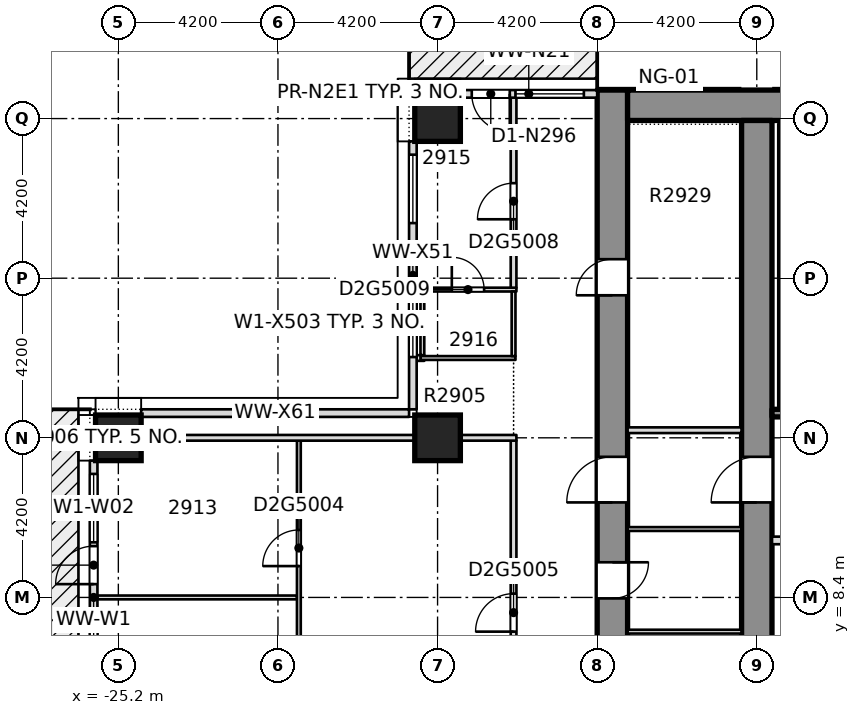
"""IFC4 building model, lengths in metres.
Left out: names, types, materials, properties, quantities, classifications, styles, units other than length and angle.
Written with IfcOpenShell. Run it as: python <this file> out.ifc"""

import sys

from ifc_helpers import new_model, si_unit, direction, frame, frame_2d, origin, origin_2d, place, context, subcontext, project, spatial, rectangle, extrude, element, fill, save


model = new_model("IFC4")
c1 = context("Model", 3, precision=1e-05, world=origin(), true_north=direction((0.0, 1.0)))
c2 = subcontext(c1, "Body", "Model", "MODEL_VIEW")
j1 = project(units=[si_unit("LENGTHUNIT", "METRE"), si_unit("PLANEANGLEUNIT", "RADIAN")], contexts=[c1])
p1 = place(None, origin())
s1 = spatial("IfcSite", under=j1, at=p1, CompositionType="ELEMENT")
p2 = place(p1, origin())
s2 = spatial("IfcBuilding", under=s1, at=p2, CompositionType="ELEMENT")
p3 = place(p2, frame((0.0, 0.0, 114.9)))
s3 = spatial("IfcBuildingStorey", under=s2, at=p3, CompositionType="ELEMENT", Elevation=114.9)
p4 = place(p3, frame((-12.2, -8.4, -0.32), z_axis=(0.0, 0.0, 1.0), x_axis=(0.0, 1.0, 0.0)))
e1 = element("IfcWall", 1, at=p4, inside=s3, PredefinedType="SHEAR", context=c2, shape_type="SweptSolid", body=[
    extrude(rectangle(XDim=30.15, YDim=0.8, at=frame_2d((15.075, 0.0))), origin(), (0.0, 0.0, 1.0), 3.45),
])
p5 = place(p4, frame((2.875, 0.0, 0.32)))
e2 = element("IfcOpeningElement", 2, at=p5, cuts=e1, PredefinedType="OPENING", context=c2, shape_type="SweptSolid", body=[
    extrude(rectangle(XDim=0.95, YDim=2.1, at=frame_2d((0.475, 1.05))), frame((0.0, 0.41, 0.0), z_axis=(0.0, -1.0, 0.0), x_axis=(1.0, 0.0, 0.0)), (0.0, 0.0, 1.0), 0.82),
])
p6 = place(p4, frame((6.575, 0.0, 0.32)))
e3 = element("IfcOpeningElement", 3, at=p6, cuts=e1, PredefinedType="OPENING", context=c2, shape_type="SweptSolid", body=[
    extrude(rectangle(XDim=0.95, YDim=2.1, at=frame_2d((0.475, 1.05))), frame((0.0, 0.41, 0.0), z_axis=(0.0, -1.0, 0.0), x_axis=(1.0, 0.0, 0.0)), (0.0, 0.0, 1.0), 0.82),
])
p7 = place(p4, frame((9.425, 0.0, 0.32)))
e4 = element("IfcOpeningElement", 4, at=p7, cuts=e1, PredefinedType="OPENING", context=c2, shape_type="SweptSolid", body=[
    extrude(rectangle(XDim=0.95, YDim=2.1, at=frame_2d((0.475, 1.05))), frame((0.0, 0.41, 0.0), z_axis=(0.0, -1.0, 0.0), x_axis=(1.0, 0.0, 0.0)), (0.0, 0.0, 1.0), 0.82),
])
p8 = place(p4, frame((13.225, 0.0, 0.32)))
e5 = element("IfcOpeningElement", 5, at=p8, cuts=e1, PredefinedType="OPENING", context=c2, shape_type="SweptSolid", body=[
    extrude(rectangle(XDim=0.95, YDim=2.1, at=frame_2d((0.475, 1.05))), frame((0.0, 0.41, 0.0), z_axis=(0.0, -1.0, 0.0), x_axis=(1.0, 0.0, 0.0)), (0.0, 0.0, 1.0), 0.82),
])
p9 = place(p4, frame((16.775, 0.0, 0.32)))
e6 = element("IfcOpeningElement", 6, at=p9, cuts=e1, PredefinedType="OPENING", context=c2, shape_type="SweptSolid", body=[
    extrude(rectangle(XDim=0.95, YDim=2.1, at=frame_2d((0.475, 1.05))), frame((0.0, 0.41, 0.0), z_axis=(0.0, -1.0, 0.0), x_axis=(1.0, 0.0, 0.0)), (0.0, 0.0, 1.0), 0.82),
])
p10 = place(p4, frame((24.75, 0.0, 0.32)))
e7 = element("IfcOpeningElement", 7, at=p10, cuts=e1, PredefinedType="OPENING", context=c2, shape_type="SweptSolid", body=[
    extrude(rectangle(XDim=0.95, YDim=2.1, at=frame_2d((0.475, 1.05))), frame((0.0, 0.41, 0.0), z_axis=(0.0, -1.0, 0.0), x_axis=(1.0, 0.0, 0.0)), (0.0, 0.0, 1.0), 0.82),
])
p11 = place(p4, frame((19.3, 0.0, 0.32)))
e8 = element("IfcOpeningElement", 8, at=p11, cuts=e1, PredefinedType="OPENING", context=c2, shape_type="SweptSolid", body=[
    extrude(rectangle(XDim=1.2, YDim=2.1, at=frame_2d((0.6, 1.05))), frame((0.0, 0.41, 0.0), z_axis=(0.0, -1.0, 0.0), x_axis=(1.0, 0.0, 0.0)), (0.0, 0.0, 1.0), 0.82),
])
p12 = place(p3, frame((-11.8, 21.35, -0.32), z_axis=(0.0, 0.0, 1.0), x_axis=(1.0, 0.0, 0.0)))
e9 = element("IfcWall", 9, at=p12, inside=s3, PredefinedType="SHEAR", context=c2, shape_type="SweptSolid", body=[
    extrude(rectangle(XDim=23.6, YDim=0.8, at=frame_2d((11.8, 0.0))), origin(), (0.0, 0.0, 1.0), 3.45),
])
p13 = place(p3, frame((-8.4, -7.6, -0.32), z_axis=(0.0, 0.0, 1.0), x_axis=(0.0, 1.0, 0.0)))
e10 = element("IfcWall", 10, at=p13, inside=s3, PredefinedType="SHEAR", context=c2, shape_type="SweptSolid", body=[
    extrude(rectangle(XDim=28.55, YDim=0.8, at=frame_2d((14.275, 0.0))), origin(), (0.0, 0.0, 1.0), 3.45),
])
p14 = place(p13, frame((18.5, 0.0, 0.32)))
e11 = element("IfcOpeningElement", 11, at=p14, cuts=e10, PredefinedType="OPENING", context=c2, shape_type="SweptSolid", body=[
    extrude(rectangle(XDim=1.2, YDim=2.1, at=frame_2d((0.6, 1.05))), frame((0.0, 0.41, 0.0), z_axis=(0.0, -1.0, 0.0), x_axis=(1.0, 0.0, 0.0)), (0.0, 0.0, 1.0), 0.82),
])
for number, where, z_axis, x_axis in (
    (12, (-25.2, 12.6, -0.32), (0.0, 0.0, 1.0), (1.0, 0.0, 0.0)),
    (13, (-16.8, 12.6, -0.32), (0.0, 0.0, 1.0), (1.0, 0.0, 0.0)),
    (14, (-16.8, 21.0, -0.32), (0.0, 0.0, 1.0), (1.0, 0.0, 0.0)),
):
    element("IfcColumn", number, at=place(p3, frame(where, z_axis=z_axis, x_axis=x_axis)), inside=s3, PredefinedType="COLUMN", context=c2, shape_type="SweptSolid", body=[
        extrude(rectangle(XDim=1.2, YDim=1.2, at=origin_2d()), origin(), (0.0, 0.0, 1.0), 3.45),
    ])
p15 = place(p3, frame((-25.75, 8.4, 0.0), z_axis=(0.0, 0.0, 1.0), x_axis=(1.0, 0.0, 0.0)))
e15 = element("IfcWall", 15, at=p15, inside=s3, PredefinedType="PARTITIONING", context=c2, shape_type="SweptSolid", body=[
    extrude(rectangle(XDim=5.25, YDim=0.1, at=frame_2d((2.625, 0.0))), origin(), (0.0, 0.0, 1.0), 3.13),
])
p16 = place(p3, frame((-25.75, 12.6, 0.0), z_axis=(0.0, 0.0, 1.0), x_axis=(1.0, 0.0, 0.0)))
e16 = element("IfcWall", 16, at=p16, inside=s3, PredefinedType="PARTITIONING", context=c2, shape_type="SweptSolid", body=[
    extrude(rectangle(XDim=1.15, YDim=0.15, at=frame_2d((0.575, 0.0))), origin(), (0.0, 0.0, 1.0), 3.13),
])
p17 = place(p3, frame((-17.35, 14.7, 0.0), z_axis=(0.0, 0.0, 1.0), x_axis=(1.0, 0.0, 0.0)))
e17 = element("IfcWall", 17, at=p17, inside=s3, PredefinedType="PARTITIONING", context=c2, shape_type="SweptSolid", body=[
    extrude(rectangle(XDim=0.2, YDim=0.15, at=frame_2d((0.1, 0.0))), origin(), (0.0, 0.0, 1.0), 3.13),
])
p18 = place(p3, frame((-17.25, 14.7, 0.0), z_axis=(0.0, 0.0, 1.0), x_axis=(1.0, 0.0, 0.0)))
e18 = element("IfcWall", 18, at=p18, inside=s3, PredefinedType="PARTITIONING", context=c2, shape_type="SweptSolid", body=[
    extrude(rectangle(XDim=2.5, YDim=0.1, at=frame_2d((1.25, 0.0))), origin(), (0.0, 0.0, 1.0), 3.13),
])
p19 = place(p3, frame((-17.25, 16.5, 0.0), z_axis=(0.0, 0.0, 1.0), x_axis=(1.0, 0.0, 0.0)))
e19 = element("IfcWall", 19, at=p19, inside=s3, PredefinedType="PARTITIONING", context=c2, shape_type="SweptSolid", body=[
    extrude(rectangle(XDim=2.525, YDim=0.1, at=frame_2d((1.262, 0.0))), origin(), (0.0, 0.0, 1.0), 3.13),
])
p20 = place(p19, frame((0.825, 0.0, 0.0)))
e20 = element("IfcOpeningElement", 20, at=p20, cuts=e19, PredefinedType="OPENING", context=c2, shape_type="SweptSolid", body=[
    extrude(rectangle(XDim=0.85, YDim=2.1, at=frame_2d((0.425, 1.05))), frame((0.0, 0.06, 0.0), z_axis=(0.0, -1.0, 0.0), x_axis=(1.0, 0.0, 0.0)), (0.0, 0.0, 1.0), 0.12),
])
p21 = place(p3, frame((-20.45, 5.05, 0.0), z_axis=(0.0, 0.0, 1.0), x_axis=(0.0, 1.0, 0.0)))
e21 = element("IfcWall", 21, at=p21, inside=s3, PredefinedType="PARTITIONING", context=c2, shape_type="SweptSolid", body=[
    extrude(rectangle(XDim=7.475, YDim=0.1, at=frame_2d((3.737, 0.0))), origin(), (0.0, 0.0, 1.0), 3.13),
])
p22 = place(p21, frame((4.175, 0.0, 0.0)))
e22 = element("IfcOpeningElement", 22, at=p22, cuts=e21, PredefinedType="OPENING", context=c2, shape_type="SweptSolid", body=[
    extrude(rectangle(XDim=0.95, YDim=2.1, at=frame_2d((0.475, 1.05))), frame((0.0, 0.06, 0.0), z_axis=(0.0, -1.0, 0.0), x_axis=(1.0, 0.0, 0.0)), (0.0, 0.0, 1.0), 0.12),
])
p23 = place(p3, frame((-17.2, 14.775, 0.0), z_axis=(0.0, 0.0, 1.0), x_axis=(0.0, 1.0, 0.0)))
e23 = element("IfcWall", 23, at=p23, inside=s3, PredefinedType="PARTITIONING", context=c2, shape_type="SweptSolid", body=[
    extrude(rectangle(XDim=1.675, YDim=0.1, at=frame_2d((0.837, 0.0))), origin(), (0.0, 0.0, 1.0), 3.13),
])
p24 = place(p3, frame((-14.8, -6.225, 0.0), z_axis=(0.0, 0.0, 1.0), x_axis=(0.0, 1.0, 0.0)))
e24 = element("IfcWall", 24, at=p24, inside=s3, PredefinedType="PARTITIONING", context=c2, shape_type="SweptSolid", body=[
    extrude(rectangle(XDim=18.75, YDim=0.15, at=frame_2d((9.375, 0.0))), origin(), (0.0, 0.0, 1.0), 3.13),
])
p25 = place(p24, frame((13.725, 0.0, 0.0)))
e25 = element("IfcOpeningElement", 25, at=p25, cuts=e24, PredefinedType="OPENING", context=c2, shape_type="SweptSolid", body=[
    extrude(rectangle(XDim=1.0, YDim=2.1, at=frame_2d((0.5, 1.05))), frame((0.0, 0.085, 0.0), z_axis=(0.0, -1.0, 0.0), x_axis=(1.0, 0.0, 0.0)), (0.0, 0.0, 1.0), 0.17),
])
p26 = place(p24, frame((5.675, 0.0, 0.0)))
e26 = element("IfcOpeningElement", 26, at=p26, cuts=e24, PredefinedType="OPENING", context=c2, shape_type="SweptSolid", body=[
    extrude(rectangle(XDim=1.1, YDim=2.1, at=frame_2d((0.55, 1.05))), frame((0.0, 0.085, 0.0), z_axis=(0.0, -1.0, 0.0), x_axis=(1.0, 0.0, 0.0)), (0.0, 0.0, 1.0), 0.17),
])
p27 = place(p3, frame((-14.8, 14.75, 0.0), z_axis=(0.0, 0.0, 1.0), x_axis=(0.0, 1.0, 0.0)))
e27 = element("IfcWall", 27, at=p27, inside=s3, PredefinedType="PARTITIONING", context=c2, shape_type="SweptSolid", body=[
    extrude(rectangle(XDim=1.7, YDim=0.1, at=frame_2d((0.85, 0.0))), origin(), (0.0, 0.0, 1.0), 3.13),
])
p28 = place(p3, frame((-14.8, 16.55, 0.0), z_axis=(0.0, 0.0, 1.0), x_axis=(0.0, 1.0, 0.0)))
e28 = element("IfcWall", 28, at=p28, inside=s3, PredefinedType="PARTITIONING", context=c2, shape_type="SweptSolid", body=[
    extrude(rectangle(XDim=5.0, YDim=0.15, at=frame_2d((2.5, 0.0))), origin(), (0.0, 0.0, 1.0), 3.13),
])
p29 = place(p28, frame((1.8, 0.0, 0.0)))
e29 = element("IfcOpeningElement", 29, at=p29, cuts=e28, PredefinedType="OPENING", context=c2, shape_type="SweptSolid", body=[
    extrude(rectangle(XDim=0.95, YDim=2.1, at=frame_2d((0.475, 1.05))), frame((0.0, 0.085, 0.0), z_axis=(0.0, -1.0, 0.0), x_axis=(1.0, 0.0, 0.0)), (0.0, 0.0, 1.0), 0.17),
])
p30 = place(p3, frame((-12.6, 21.65, 0.0), z_axis=(0.0, 0.0, 1.0), x_axis=(-1.0, 0.0, 0.0)))
e30 = element("IfcWall", 30, at=p30, inside=s3, PredefinedType="STANDARD", context=c2, shape_type="SweptSolid", body=[
    extrude(rectangle(XDim=3.6, YDim=0.2, at=frame_2d((1.8, 0.0))), origin(), (0.0, 0.0, 1.0), 3.13),
])
p31 = place(p30, frame((0.35, 0.0, 0.2)))
e31 = element("IfcOpeningElement", 31, at=p31, cuts=e30, PredefinedType="OPENING", context=c2, shape_type="SweptSolid", body=[
    extrude(rectangle(XDim=1.8, YDim=2.65, at=frame_2d((0.9, 1.325))), frame((0.0, 0.11, 0.0), z_axis=(0.0, -1.0, 0.0), x_axis=(1.0, 0.0, 0.0)), (0.0, 0.0, 1.0), 0.22),
])
p32 = place(p30, frame((2.3, 0.0, 0.0)))
e32 = element("IfcOpeningElement", 32, at=p32, cuts=e30, PredefinedType="OPENING", context=c2, shape_type="SweptSolid", body=[
    extrude(rectangle(XDim=1.0, YDim=2.4, at=frame_2d((0.5, 1.2))), frame((0.0, 0.11, 0.0), z_axis=(0.0, -1.0, 0.0), x_axis=(1.0, 0.0, 0.0)), (0.0, 0.0, 1.0), 0.22),
])
p33 = place(p3, frame((-17.45, 20.4, 0.0), z_axis=(0.0, 0.0, 1.0), x_axis=(0.0, -1.0, 0.0)))
e33 = element("IfcWall", 33, at=p33, inside=s3, PredefinedType="STANDARD", context=c2, shape_type="SweptSolid", body=[
    extrude(rectangle(XDim=7.05, YDim=0.2, at=frame_2d((3.525, 0.0))), origin(), (0.0, 0.0, 1.0), 3.13),
])
p34 = place(p33, frame((3.875, 0.0, 0.2)))
e34 = element("IfcOpeningElement", 34, at=p34, cuts=e33, PredefinedType="OPENING", context=c2, shape_type="SweptSolid", body=[
    extrude(rectangle(XDim=1.8, YDim=2.65, at=frame_2d((0.9, 1.325))), frame((0.0, 0.11, 0.0), z_axis=(0.0, -1.0, 0.0), x_axis=(1.0, 0.0, 0.0)), (0.0, 0.0, 1.0), 0.22),
])
p35 = place(p33, frame((0.35, 0.0, 0.2)))
e35 = element("IfcOpeningElement", 35, at=p35, cuts=e33, PredefinedType="OPENING", context=c2, shape_type="SweptSolid", body=[
    extrude(rectangle(XDim=1.8, YDim=2.65, at=frame_2d((0.9, 1.325))), frame((0.0, 0.11, 0.0), z_axis=(0.0, -1.0, 0.0), x_axis=(1.0, 0.0, 0.0)), (0.0, 0.0, 1.0), 0.22),
])
p36 = place(p3, frame((-17.55, 13.25, 0.0), z_axis=(0.0, 0.0, 1.0), x_axis=(-1.0, 0.0, 0.0)))
e36 = element("IfcWall", 36, at=p36, inside=s3, PredefinedType="STANDARD", context=c2, shape_type="SweptSolid", body=[
    extrude(rectangle(XDim=7.05, YDim=0.2, at=frame_2d((3.525, 0.0))), origin(), (0.0, 0.0, 1.0), 3.13),
])
p37 = place(p3, frame((-25.85, 12.0, 0.0), z_axis=(0.0, 0.0, 1.0), x_axis=(0.0, -1.0, 0.0)))
e37 = element("IfcWall", 37, at=p37, inside=s3, PredefinedType="STANDARD", context=c2, shape_type="SweptSolid", body=[
    extrude(rectangle(XDim=7.2, YDim=0.2, at=frame_2d((3.6, 0.0))), origin(), (0.0, 0.0, 1.0), 3.13),
])
p38 = place(p37, frame((3.95, 0.0, 0.2)))
e38 = element("IfcOpeningElement", 38, at=p38, cuts=e37, PredefinedType="OPENING", context=c2, shape_type="SweptSolid", body=[
    extrude(rectangle(XDim=1.8, YDim=2.65, at=frame_2d((0.9, 1.325))), frame((0.0, 0.11, 0.0), z_axis=(0.0, -1.0, 0.0), x_axis=(1.0, 0.0, 0.0)), (0.0, 0.0, 1.0), 0.22),
])
p39 = place(p37, frame((5.85, 0.0, 0.0)))
e39 = element("IfcOpeningElement", 39, at=p39, cuts=e37, PredefinedType="OPENING", context=c2, shape_type="SweptSolid", body=[
    extrude(rectangle(XDim=1.0, YDim=2.4, at=frame_2d((0.5, 1.2))), frame((0.0, 0.11, 0.0), z_axis=(0.0, -1.0, 0.0), x_axis=(1.0, 0.0, 0.0)), (0.0, 0.0, 1.0), 0.22),
])
p40 = place(p37, frame((0.35, 0.0, 0.2)))
e40 = element("IfcOpeningElement", 40, at=p40, cuts=e37, PredefinedType="OPENING", context=c2, shape_type="SweptSolid", body=[
    extrude(rectangle(XDim=1.8, YDim=2.65, at=frame_2d((0.9, 1.325))), frame((0.0, 0.11, 0.0), z_axis=(0.0, -1.0, 0.0), x_axis=(1.0, 0.0, 0.0)), (0.0, 0.0, 1.0), 0.22),
])
p41 = place(p37, frame((2.25, 0.0, 0.0)))
e41 = element("IfcOpeningElement", 41, at=p41, cuts=e37, PredefinedType="OPENING", context=c2, shape_type="SweptSolid", body=[
    extrude(rectangle(XDim=1.0, YDim=2.4, at=frame_2d((0.5, 1.2))), frame((0.0, 0.11, 0.0), z_axis=(0.0, -1.0, 0.0), x_axis=(1.0, 0.0, 0.0)), (0.0, 0.0, 1.0), 0.22),
])
p42 = place(p3, frame((-7.999, 9.9, 0.0), z_axis=(0.0, 0.0, 1.0), x_axis=(1.0, 0.0, 0.0)))
e42 = element("IfcWall", 42, at=p42, inside=s3, PredefinedType="PARTITIONING", context=c2, shape_type="SweptSolid", body=[
    extrude(rectangle(XDim=4.399, YDim=0.2, at=frame_2d((2.199, 0.0))), origin(), (0.0, 0.0, 1.0), 3.13),
])
p43 = place(p42, frame((1.049, 0.0, 0.0)))
e43 = element("IfcOpeningElement", 43, at=p43, cuts=e42, PredefinedType="OPENING", context=c2, shape_type="SweptSolid", body=[
    extrude(rectangle(XDim=1.1, YDim=2.1, at=frame_2d((0.55, 1.05))), frame((0.0, 0.11, 0.0), z_axis=(0.0, -1.0, 0.0), x_axis=(1.0, 0.0, 0.0)), (0.0, 0.0, 1.0), 0.22),
])
p44 = place(p3, frame((-7.999, 13.25, 0.0), z_axis=(0.0, 0.0, 1.0), x_axis=(1.0, 0.0, 0.0)))
e44 = element("IfcWall", 44, at=p44, inside=s3, PredefinedType="SOLIDWALL", context=c2, shape_type="SweptSolid", body=[
    extrude(rectangle(XDim=4.574, YDim=0.2, at=frame_2d((2.287, 0.0))), origin(), (0.0, 0.0, 1.0), 3.13),
])
p45 = place(p44, frame((1.549, 0.0, 0.0)))
e45 = element("IfcOpeningElement", 45, at=p45, cuts=e44, PredefinedType="OPENING", context=c2, shape_type="SweptSolid", body=[
    extrude(rectangle(XDim=1.2, YDim=2.1, at=frame_2d((0.6, 1.05))), frame((0.0, 0.11, 0.0), z_axis=(0.0, -1.0, 0.0), x_axis=(1.0, 0.0, 0.0)), (0.0, 0.0, 1.0), 0.22),
])
for number, where, z_axis, x_axis in (
    (46, (-11.799, 7.5, 0.0), (0.0, 0.0, 1.0), (1.0, 0.0, 0.0)),
    (47, (-11.799, 10.2, 0.0), (0.0, 0.0, 1.0), (1.0, 0.0, 0.0)),
):
    element("IfcWall", number, at=place(p3, frame(where, z_axis=z_axis, x_axis=x_axis)), inside=s3, PredefinedType="PARTITIONING", context=c2, shape_type="SweptSolid", body=[
        extrude(rectangle(XDim=2.998, YDim=0.1, at=frame_2d((1.499, 0.0))), origin(), (0.0, 0.0, 1.0), 3.13),
    ])
p46 = place(p3, frame((-11.799, 12.8, 0.0), z_axis=(0.0, 0.0, 1.0), x_axis=(1.0, 0.0, 0.0)))
e48 = element("IfcWall", 48, at=p46, inside=s3, PredefinedType="PARTITIONING", context=c2, shape_type="SweptSolid", body=[
    extrude(rectangle(XDim=2.998, YDim=0.15, at=frame_2d((1.499, 0.0))), origin(), (0.0, 0.0, 1.0), 3.13),
])
p47 = place(p3, frame((-24.6, 12.6, 0.0), z_axis=(0.0, 0.0, 1.0), x_axis=(1.0, 0.0, 0.0)))
e49 = element("IfcWall", 49, at=p47, inside=s3, PredefinedType="PARTITIONING", context=c2, shape_type="SweptSolid", body=[
    extrude(rectangle(XDim=7.2, YDim=0.15, at=frame_2d((3.6, 0.0))), origin(), (0.0, 0.0, 1.0), 2.58),
])
p48 = place(p3, frame((-17.4, 12.6, 0.0), z_axis=(0.0, 0.0, 1.0), x_axis=(1.0, 0.0, 0.0)))
e50 = element("IfcWall", 50, at=p48, inside=s3, PredefinedType="PARTITIONING", context=c2, shape_type="SweptSolid", body=[
    extrude(rectangle(XDim=2.675, YDim=0.15, at=frame_2d((1.337, 0.0))), origin(), (0.0, 0.0, 1.0), 3.13),
])
p49 = place(p22, origin())
e51 = element("IfcDoor", 51, at=p49, inside=s3, OperationType="SINGLE_SWING_LEFT", PredefinedType="DOOR", context=c2, shape_type="SweptSolid", body=[
    extrude(rectangle(XDim=0.95, YDim=2.1, at=frame_2d((0.475, 1.05))), frame((0.0, 0.025, 0.0), z_axis=(0.0, -1.0, 0.0), x_axis=(1.0, 0.0, 0.0)), (0.0, 0.0, 1.0), 0.05),
])
fill(e22, e51)
p50 = place(p25, origin())
e52 = element("IfcDoor", 52, at=p50, inside=s3, OperationType="SINGLE_SWING_LEFT", PredefinedType="DOOR", context=c2, shape_type="SweptSolid", body=[
    extrude(rectangle(XDim=1.0, YDim=2.1, at=frame_2d((0.5, 1.05))), frame((0.0, 0.025, 0.0), z_axis=(0.0, -1.0, 0.0), x_axis=(1.0, 0.0, 0.0)), (0.0, 0.0, 1.0), 0.05),
])
fill(e25, e52)
p51 = place(p29, origin())
e53 = element("IfcDoor", 53, at=p51, inside=s3, OperationType="SINGLE_SWING_RIGHT", PredefinedType="DOOR", context=c2, shape_type="SweptSolid", body=[
    extrude(rectangle(XDim=0.95, YDim=2.1, at=frame_2d((0.475, 1.05))), frame((0.0, 0.025, 0.0), z_axis=(0.0, -1.0, 0.0), x_axis=(1.0, 0.0, 0.0)), (0.0, 0.0, 1.0), 0.05),
])
fill(e29, e53)
p52 = place(p20, origin())
e54 = element("IfcDoor", 54, at=p52, inside=s3, OperationType="SINGLE_SWING_RIGHT", PredefinedType="DOOR", context=c2, shape_type="SweptSolid", body=[
    extrude(rectangle(XDim=0.85, YDim=2.1, at=frame_2d((0.425, 1.05))), frame((0.0, 0.025, 0.0), z_axis=(0.0, -1.0, 0.0), x_axis=(1.0, 0.0, 0.0)), (0.0, 0.0, 1.0), 0.05),
])
fill(e20, e54)
p53 = place(p31, origin())
e55 = element("IfcWindow", 55, at=p53, inside=s3, PartitioningType="SINGLE_PANEL", PredefinedType="WINDOW", context=c2, shape_type="SweptSolid", body=[
    extrude(rectangle(XDim=1.8, YDim=2.65, at=frame_2d((0.9, 1.325))), frame((0.0, 0.03, 0.0), z_axis=(0.0, -1.0, 0.0), x_axis=(1.0, 0.0, 0.0)), (0.0, 0.0, 1.0), 0.06),
])
fill(e31, e55)
p54 = place(p32, origin())
e56 = element("IfcDoor", 56, at=p54, inside=s3, OperationType="SINGLE_SWING_LEFT", PredefinedType="DOOR", context=c2, shape_type="SweptSolid", body=[
    extrude(rectangle(XDim=1.0, YDim=2.4, at=frame_2d((0.5, 1.2))), frame((0.0, 0.025, 0.0), z_axis=(0.0, -1.0, 0.0), x_axis=(1.0, 0.0, 0.0)), (0.0, 0.0, 1.0), 0.05),
])
fill(e32, e56)
p55 = place(p34, origin())
e57 = element("IfcWindow", 57, at=p55, inside=s3, PartitioningType="SINGLE_PANEL", PredefinedType="WINDOW", context=c2, shape_type="SweptSolid", body=[
    extrude(rectangle(XDim=1.8, YDim=2.65, at=frame_2d((0.9, 1.325))), frame((0.0, 0.03, 0.0), z_axis=(0.0, -1.0, 0.0), x_axis=(1.0, 0.0, 0.0)), (0.0, 0.0, 1.0), 0.06),
])
fill(e34, e57)
p56 = place(p35, origin())
e58 = element("IfcWindow", 58, at=p56, inside=s3, PartitioningType="SINGLE_PANEL", PredefinedType="WINDOW", context=c2, shape_type="SweptSolid", body=[
    extrude(rectangle(XDim=1.8, YDim=2.65, at=frame_2d((0.9, 1.325))), frame((0.0, 0.03, 0.0), z_axis=(0.0, -1.0, 0.0), x_axis=(1.0, 0.0, 0.0)), (0.0, 0.0, 1.0), 0.06),
])
fill(e35, e58)
p57 = place(p38, origin())
e59 = element("IfcWindow", 59, at=p57, inside=s3, PartitioningType="SINGLE_PANEL", PredefinedType="WINDOW", context=c2, shape_type="SweptSolid", body=[
    extrude(rectangle(XDim=1.8, YDim=2.65, at=frame_2d((0.9, 1.325))), frame((0.0, 0.03, 0.0), z_axis=(0.0, -1.0, 0.0), x_axis=(1.0, 0.0, 0.0)), (0.0, 0.0, 1.0), 0.06),
])
fill(e38, e59)
p58 = place(p40, origin())
e60 = element("IfcWindow", 60, at=p58, inside=s3, PartitioningType="SINGLE_PANEL", PredefinedType="WINDOW", context=c2, shape_type="SweptSolid", body=[
    extrude(rectangle(XDim=1.8, YDim=2.65, at=frame_2d((0.9, 1.325))), frame((0.0, 0.03, 0.0), z_axis=(0.0, -1.0, 0.0), x_axis=(1.0, 0.0, 0.0)), (0.0, 0.0, 1.0), 0.06),
])
fill(e40, e60)
p59 = place(p41, origin())
e61 = element("IfcDoor", 61, at=p59, inside=s3, OperationType="SINGLE_SWING_LEFT", PredefinedType="DOOR", context=c2, shape_type="SweptSolid", body=[
    extrude(rectangle(XDim=1.0, YDim=2.4, at=frame_2d((0.5, 1.2))), frame((0.0, 0.025, 0.0), z_axis=(0.0, -1.0, 0.0), x_axis=(1.0, 0.0, 0.0)), (0.0, 0.0, 1.0), 0.05),
])
fill(e41, e61)
p60 = place(p9, origin())
e62 = element("IfcDoor", 62, at=p60, inside=s3, OperationType="SINGLE_SWING_LEFT", PredefinedType="DOOR", context=c2, shape_type="SweptSolid", body=[
    extrude(rectangle(XDim=0.95, YDim=2.1, at=frame_2d((0.475, 1.05))), frame((0.0, 0.025, 0.0), z_axis=(0.0, -1.0, 0.0), x_axis=(1.0, 0.0, 0.0)), (0.0, 0.0, 1.0), 0.05),
])
fill(e6, e62)
p61 = place(p10, origin())
e63 = element("IfcDoor", 63, at=p61, inside=s3, OperationType="SINGLE_SWING_LEFT", PredefinedType="DOOR", context=c2, shape_type="SweptSolid", body=[
    extrude(rectangle(XDim=0.95, YDim=2.1, at=frame_2d((0.475, 1.05))), frame((0.0, 0.025, 0.0), z_axis=(0.0, -1.0, 0.0), x_axis=(1.0, 0.0, 0.0)), (0.0, 0.0, 1.0), 0.05),
])
fill(e7, e63)
p62 = place(p11, origin())
e64 = element("IfcDoor", 64, at=p62, inside=s3, OperationType="SINGLE_SWING_LEFT", PredefinedType="DOOR", context=c2, shape_type="SweptSolid", body=[
    extrude(rectangle(XDim=1.2, YDim=2.1, at=frame_2d((0.6, 1.05))), frame((0.0, 0.025, 0.0), z_axis=(0.0, -1.0, 0.0), x_axis=(1.0, 0.0, 0.0)), (0.0, 0.0, 1.0), 0.05),
])
fill(e8, e64)
p63 = place(p14, origin())
e65 = element("IfcDoor", 65, at=p63, inside=s3, OperationType="SINGLE_SWING_LEFT", PredefinedType="DOOR", context=c2, shape_type="SweptSolid", body=[
    extrude(rectangle(XDim=1.2, YDim=2.1, at=frame_2d((0.6, 1.05))), frame((0.0, 0.025, 0.0), z_axis=(0.0, -1.0, 0.0), x_axis=(1.0, 0.0, 0.0)), (0.0, 0.0, 1.0), 0.05),
])
fill(e11, e65)
save(model, sys.argv[1])
